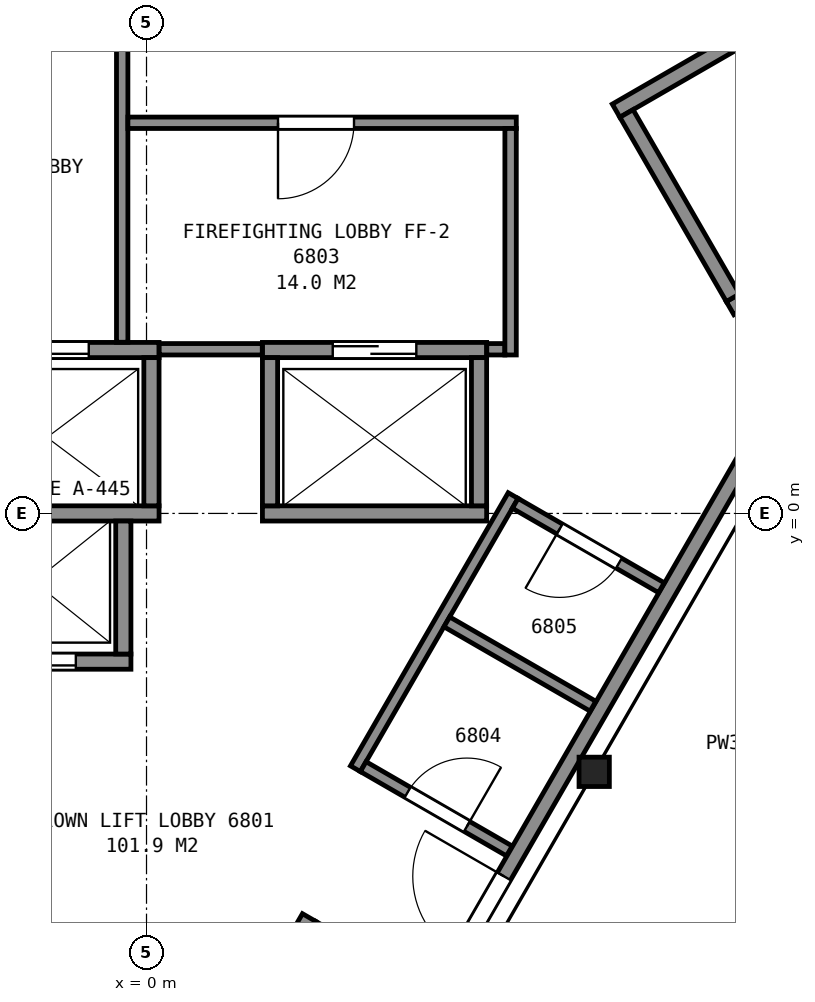
"""IFC4 building model, lengths in metres.
Left out: names, types, materials, properties, quantities, classifications, styles, units other than length and angle.
Written with IfcOpenShell. Run it as: python <this file> out.ifc"""

import sys

from ifc_helpers import new_model, si_unit, direction, frame, frame_2d, origin, origin_2d, place, context, subcontext, project, spatial, rectangle, i_section, extrude, element, fill, save


model = new_model("IFC4")
c1 = context("Model", 3, precision=1e-05, world=origin(), true_north=direction((0.0, 1.0)))
c2 = subcontext(c1, "Body", "Model", "MODEL_VIEW")
j1 = project(units=[si_unit("LENGTHUNIT", "METRE"), si_unit("PLANEANGLEUNIT", "RADIAN")], contexts=[c1])
p1 = place(None, origin())
s1 = spatial("IfcSite", under=j1, at=p1, CompositionType="ELEMENT")
p2 = place(p1, origin())
s2 = spatial("IfcBuilding", under=s1, at=p2, CompositionType="ELEMENT")
p3 = place(p2, frame((0.0, 0.0, 271.4)))
s3 = spatial("IfcBuildingStorey", under=s2, at=p3, CompositionType="ELEMENT", Elevation=271.4)
p4 = place(p3, frame((5.89, -3.4, 0.0), z_axis=(0.0, 0.0, 1.0), x_axis=(1.0, 0.0, 0.0)))
e1 = element("IfcColumn", 1, at=p4, inside=s3, PredefinedType="COLUMN", context=c2, shape_type="SweptSolid", body=[
    extrude(i_section(OverallWidth=0.399, OverallDepth=0.386, WebThickness=0.021, FlangeThickness=0.033, FilletRadius=0.015, at=origin_2d()), origin(), (0.0, 0.0, 1.0), 3.7),
])
for number, where, z_axis, x_axis in (
    (2, (6.178, 5.299, 0.0), (0.0, 0.0, 1.0), (0.866, 0.5, 0.0)),
    (3, (7.678, 2.701, 0.0), (0.0, 0.0, 1.0), (0.866, 0.5, 0.0)),
):
    element("IfcWall", number, at=place(p3, frame(where, z_axis=z_axis, x_axis=x_axis)), inside=s3, PredefinedType="PARTITIONING", context=c2, shape_type="SweptSolid", body=[
        extrude(rectangle(XDim=7.2, YDim=0.2, at=frame_2d((3.6, 0.0))), origin(), (0.0, 0.0, 1.0), 3.45),
    ])
p5 = place(p3, frame((7.715, 2.838, 0.0), z_axis=(0.0, 0.0, 1.0), x_axis=(-0.500049511043, 0.865996816683, 0.0)))
e4 = element("IfcWall", 4, at=p5, inside=s3, PredefinedType="PARTITIONING", context=c2, shape_type="SweptSolid", body=[
    extrude(rectangle(XDim=2.8, YDim=0.2, at=frame_2d((1.4, 0.0))), origin(), (0.0, 0.0, 1.0), 3.45),
])
p6 = place(p3, frame((-2.755, -1.95, 0.0), z_axis=(0.0, 0.0, 1.0), x_axis=(1.0, 0.0, 0.0)))
e5 = element("IfcWall", 5, at=p6, inside=s3, PredefinedType="PARTITIONING", context=c2, shape_type="SweptSolid", body=[
    extrude(rectangle(XDim=2.55, YDim=0.2, at=frame_2d((1.275, 0.0))), origin(), (0.0, 0.0, 1.0), 3.7),
])
p7 = place(p6, frame((0.725, 0.0, 0.0)))
e6 = element("IfcOpeningElement", 6, at=p7, cuts=e5, PredefinedType="OPENING", context=c2, shape_type="SweptSolid", body=[
    extrude(rectangle(XDim=1.1, YDim=2.1, at=frame_2d((0.55, 1.05))), frame((0.0, 0.11, 0.0), z_axis=(0.0, -1.0, 0.0), x_axis=(1.0, 0.0, 0.0)), (0.0, 0.0, 1.0), 0.22),
])
p8 = place(p3, frame((-2.785, 0.0, 0.0), z_axis=(0.0, 0.0, 1.0), x_axis=(1.0, 0.0, 0.0)))
e7 = element("IfcWall", 7, at=p8, inside=s3, PredefinedType="PARTITIONING", context=c2, shape_type="SweptSolid", body=[
    extrude(rectangle(XDim=2.95, YDim=0.2, at=frame_2d((1.475, 0.0))), origin(), (0.0, 0.0, 1.0), 3.7),
])
p9 = place(p3, frame((1.525, 0.0, 0.0), z_axis=(0.0, 0.0, 1.0), x_axis=(1.0, 0.0, 0.0)))
e8 = element("IfcWall", 8, at=p9, inside=s3, PredefinedType="PARTITIONING", context=c2, shape_type="SweptSolid", body=[
    extrude(rectangle(XDim=2.95, YDim=0.2, at=frame_2d((1.475, 0.0))), origin(), (0.0, 0.0, 1.0), 3.7),
])
p10 = place(p3, frame((-2.785, 2.15, 0.0), z_axis=(0.0, 0.0, 1.0), x_axis=(1.0, 0.0, 0.0)))
e9 = element("IfcWall", 9, at=p10, inside=s3, PredefinedType="PARTITIONING", context=c2, shape_type="SweptSolid", body=[
    extrude(rectangle(XDim=2.95, YDim=0.2, at=frame_2d((1.475, 0.0))), origin(), (0.0, 0.0, 1.0), 3.7),
])
p11 = place(p10, frame((0.925, 0.0, 0.0)))
e10 = element("IfcOpeningElement", 10, at=p11, cuts=e9, PredefinedType="OPENING", context=c2, shape_type="SweptSolid", body=[
    extrude(rectangle(XDim=1.1, YDim=2.1, at=frame_2d((0.55, 1.05))), frame((0.0, 0.11, 0.0), z_axis=(0.0, -1.0, 0.0), x_axis=(1.0, 0.0, 0.0)), (0.0, 0.0, 1.0), 0.22),
])
p12 = place(p3, frame((1.525, 2.15, 0.0), z_axis=(0.0, 0.0, 1.0), x_axis=(1.0, 0.0, 0.0)))
e11 = element("IfcWall", 11, at=p12, inside=s3, PredefinedType="PARTITIONING", context=c2, shape_type="SweptSolid", body=[
    extrude(rectangle(XDim=2.95, YDim=0.2, at=frame_2d((1.475, 0.0))), origin(), (0.0, 0.0, 1.0), 3.7),
])
p13 = place(p12, frame((0.925, 0.0, 0.0)))
e12 = element("IfcOpeningElement", 12, at=p13, cuts=e11, PredefinedType="OPENING", context=c2, shape_type="SweptSolid", body=[
    extrude(rectangle(XDim=1.1, YDim=2.1, at=frame_2d((0.55, 1.05))), frame((0.0, 0.11, 0.0), z_axis=(0.0, -1.0, 0.0), x_axis=(1.0, 0.0, 0.0)), (0.0, 0.0, 1.0), 0.22),
])
p14 = place(p3, frame((0.863, -7.525, 0.0), z_axis=(0.0, 0.0, 1.0), x_axis=(0.499990435942, 0.866030925526, 0.0)))
e13 = element("IfcWall", 13, at=p14, inside=s3, PredefinedType="PARTITIONING", context=c2, shape_type="SweptSolid", body=[
    extrude(rectangle(XDim=2.55, YDim=0.2, at=frame_2d((1.275, 0.0))), origin(), (0.0, 0.0, 1.0), 3.7),
])
p15 = place(p14, frame((0.725, 0.0, 0.0)))
e14 = element("IfcOpeningElement", 14, at=p15, cuts=e13, PredefinedType="OPENING", context=c2, shape_type="SweptSolid", body=[
    extrude(rectangle(XDim=1.1, YDim=2.1, at=frame_2d((0.55, 1.05))), frame((0.0, 0.11, 0.0), z_axis=(0.0, -1.0, 0.0), x_axis=(1.0, 0.0, 0.0)), (0.0, 0.0, 1.0), 0.22),
])
for number, where, z_axis, x_axis in (
    (15, (4.375, 0.1, 0.0), (0.0, 0.0, 1.0), (0.0, 1.0, 0.0)),
    (16, (1.625, 0.1, 0.0), (0.0, 0.0, 1.0), (0.0, 1.0, 0.0)),
    (17, (0.065, 0.1, 0.0), (0.0, 0.0, 1.0), (0.0, 1.0, 0.0)),
):
    element("IfcWall", number, at=place(p3, frame(where, z_axis=z_axis, x_axis=x_axis)), inside=s3, PredefinedType="PARTITIONING", context=c2, shape_type="SweptSolid", body=[
        extrude(rectangle(XDim=1.95, YDim=0.2, at=frame_2d((0.975, 0.0))), origin(), (0.0, 0.0, 1.0), 3.7),
    ])
for number, where, z_axis, x_axis in (
    (18, (-0.305, -1.85, 0.0), (0.0, 0.0, 1.0), (0.0, 1.0, 0.0)),
    (19, (3.69, -6.328, 0.0), (0.0, 0.0, 1.0), (-0.866, 0.5, 0.0)),
):
    element("IfcWall", number, at=place(p3, frame(where, z_axis=z_axis, x_axis=x_axis)), inside=s3, PredefinedType="PARTITIONING", context=c2, shape_type="SweptSolid", body=[
        extrude(rectangle(XDim=1.75, YDim=0.2, at=frame_2d((0.875, 0.0))), origin(), (0.0, 0.0, 1.0), 3.7),
    ])
p16 = place(p3, frame((-0.32, 2.252, 0.0), z_axis=(0.0, 0.0, 1.0), x_axis=(0.0, 1.0, 0.0)))
e20 = element("IfcWall", 20, at=p16, inside=s3, PredefinedType="PARTITIONING", context=c2, shape_type="SweptSolid", body=[
    extrude(rectangle(XDim=4.063, YDim=0.15, at=frame_2d((2.031, 0.0))), origin(), (0.0, 0.0, 1.0), 3.45),
])
p17 = place(p3, frame((-0.245, 5.14, 0.0), z_axis=(0.0, 0.0, 1.0), x_axis=(1.0, 0.0, 0.0)))
e21 = element("IfcWall", 21, at=p17, inside=s3, PredefinedType="PARTITIONING", context=c2, shape_type="SweptSolid", body=[
    extrude(rectangle(XDim=5.11, YDim=0.15, at=frame_2d((2.555, 0.0))), origin(), (0.0, 0.0, 1.0), 3.45),
])
p18 = place(p17, frame((1.975, 0.0, 0.0)))
e22 = element("IfcOpeningElement", 22, at=p18, cuts=e21, PredefinedType="OPENING", context=c2, shape_type="SweptSolid", body=[
    extrude(rectangle(XDim=1.0, YDim=2.1, at=frame_2d((0.5, 1.05))), frame((0.0, 0.085, 0.0), z_axis=(0.0, -1.0, 0.0), x_axis=(1.0, 0.0, 0.0)), (0.0, 0.0, 1.0), 0.17),
])
p19 = place(p3, frame((0.167, 2.16, 0.0), z_axis=(0.0, 0.0, 1.0), x_axis=(1.0, 0.0, 0.0)))
e23 = element("IfcWall", 23, at=p19, inside=s3, PredefinedType="PARTITIONING", context=c2, shape_type="SweptSolid", body=[
    extrude(rectangle(XDim=1.356, YDim=0.15, at=frame_2d((0.678, 0.0))), origin(), (0.0, 0.0, 1.0), 3.45),
])
p20 = place(p3, frame((2.749, -3.359, 0.0), z_axis=(0.0, 0.0, 1.0), x_axis=(0.500017827812, 0.866015110648, 0.0)))
e24 = element("IfcWall", 24, at=p20, inside=s3, PredefinedType="PARTITIONING", context=c2, shape_type="SweptSolid", body=[
    extrude(rectangle(XDim=4.15, YDim=0.15, at=frame_2d((2.075, 0.0))), origin(), (0.0, 0.0, 1.0), 3.45),
])
p21 = place(p3, frame((2.851, -3.332, 0.0), z_axis=(0.0, 0.0, 1.0), x_axis=(0.866110524189, -0.499852538144, 0.0)))
e25 = element("IfcWall", 25, at=p21, inside=s3, PredefinedType="PARTITIONING", context=c2, shape_type="SweptSolid", body=[
    extrude(rectangle(XDim=2.22, YDim=0.15, at=frame_2d((1.11, 0.0))), origin(), (0.0, 0.0, 1.0), 3.45),
])
p22 = place(p21, frame((0.675, 0.0, 0.0)))
e26 = element("IfcOpeningElement", 26, at=p22, cuts=e25, PredefinedType="OPENING", context=c2, shape_type="SweptSolid", body=[
    extrude(rectangle(XDim=0.9, YDim=2.1, at=frame_2d((0.45, 1.05))), frame((0.0, 0.085, 0.0), z_axis=(0.0, -1.0, 0.0), x_axis=(1.0, 0.0, 0.0)), (0.0, 0.0, 1.0), 0.17),
])
p23 = place(p3, frame((3.828, -6.29, 0.0), z_axis=(0.0, 0.0, 1.0), x_axis=(0.499979739078, 0.866037101117, 0.0)))
e27 = element("IfcWall", 27, at=p23, inside=s3, PredefinedType="PARTITIONING", context=c2, shape_type="SweptSolid", body=[
    extrude(rectangle(XDim=11.363, YDim=0.2, at=frame_2d((5.681, 0.0))), origin(), (0.0, 0.0, 1.0), 3.45),
])
p24 = place(p23, frame((0.55, 0.0, 0.0)))
e28 = element("IfcOpeningElement", 28, at=p24, cuts=e27, PredefinedType="OPENING", context=c2, shape_type="SweptSolid", body=[
    extrude(rectangle(XDim=1.2, YDim=2.1, at=frame_2d((0.6, 1.05))), frame((0.0, 0.11, 0.0), z_axis=(0.0, -1.0, 0.0), x_axis=(1.0, 0.0, 0.0)), (0.0, 0.0, 1.0), 0.22),
])
p25 = place(p3, frame((3.951, -1.427, 0.0), z_axis=(0.0, 0.0, 1.0), x_axis=(0.866062920605, -0.499935013329, 0.0)))
e29 = element("IfcWall", 29, at=p25, inside=s3, PredefinedType="PARTITIONING", context=c2, shape_type="SweptSolid", body=[
    extrude(rectangle(XDim=2.22, YDim=0.15, at=frame_2d((1.11, 0.0))), origin(), (0.0, 0.0, 1.0), 3.45),
])
p26 = place(p3, frame((4.477, 2.16, 0.0), z_axis=(0.0, 0.0, 1.0), x_axis=(1.0, 0.0, 0.0)))
e30 = element("IfcWall", 30, at=p26, inside=s3, PredefinedType="PARTITIONING", context=c2, shape_type="SweptSolid", body=[
    extrude(rectangle(XDim=0.238, YDim=0.15, at=frame_2d((0.119, 0.0))), origin(), (0.0, 0.0, 1.0), 3.45),
])
p27 = place(p3, frame((6.774, -0.978, 0.0), z_axis=(0.0, 0.0, 1.0), x_axis=(-0.866062920605, 0.499935013329, 0.0)))
e31 = element("IfcWall", 31, at=p27, inside=s3, PredefinedType="PARTITIONING", context=c2, shape_type="SweptSolid", body=[
    extrude(rectangle(XDim=2.22, YDim=0.15, at=frame_2d((1.11, 0.0))), origin(), (0.0, 0.0, 1.0), 3.45),
])
p28 = place(p27, frame((0.646, 0.0, 0.0)))
e32 = element("IfcOpeningElement", 32, at=p28, cuts=e31, PredefinedType="OPENING", context=c2, shape_type="SweptSolid", body=[
    extrude(rectangle(XDim=0.9, YDim=2.1, at=frame_2d((0.45, 1.05))), frame((0.0, 0.085, 0.0), z_axis=(0.0, -1.0, 0.0), x_axis=(1.0, 0.0, 0.0)), (0.0, 0.0, 1.0), 0.17),
])
p29 = place(p3, frame((4.79, 2.085, 0.0), z_axis=(0.0, 0.0, 1.0), x_axis=(0.0, 1.0, 0.0)))
e33 = element("IfcWall", 33, at=p29, inside=s3, PredefinedType="PARTITIONING", context=c2, shape_type="SweptSolid", body=[
    extrude(rectangle(XDim=2.98, YDim=0.15, at=frame_2d((1.49, 0.0))), origin(), (0.0, 0.0, 1.0), 3.45),
])
p30 = place(p7, origin())
e34 = element("IfcDoor", 34, at=p30, inside=s3, OperationType="SLIDING_TO_RIGHT", PredefinedType="DOOR", context=c2, shape_type="SweptSolid", body=[
    extrude(rectangle(XDim=1.1, YDim=2.1, at=frame_2d((0.55, 1.05))), frame((0.0, 0.025, 0.0), z_axis=(0.0, -1.0, 0.0), x_axis=(1.0, 0.0, 0.0)), (0.0, 0.0, 1.0), 0.05),
])
fill(e6, e34)
p31 = place(p11, origin())
e35 = element("IfcDoor", 35, at=p31, inside=s3, OperationType="SLIDING_TO_LEFT", PredefinedType="DOOR", context=c2, shape_type="SweptSolid", body=[
    extrude(rectangle(XDim=1.1, YDim=2.1, at=frame_2d((0.55, 1.05))), frame((0.0, 0.025, 0.0), z_axis=(0.0, -1.0, 0.0), x_axis=(1.0, 0.0, 0.0)), (0.0, 0.0, 1.0), 0.05),
])
fill(e10, e35)
p32 = place(p13, origin())
e36 = element("IfcDoor", 36, at=p32, inside=s3, OperationType="SLIDING_TO_RIGHT", PredefinedType="DOOR", context=c2, shape_type="SweptSolid", body=[
    extrude(rectangle(XDim=1.1, YDim=2.1, at=frame_2d((0.55, 1.05))), frame((0.0, 0.025, 0.0), z_axis=(0.0, -1.0, 0.0), x_axis=(1.0, 0.0, 0.0)), (0.0, 0.0, 1.0), 0.05),
])
fill(e12, e36)
p33 = place(p18, origin())
e37 = element("IfcDoor", 37, at=p33, inside=s3, OperationType="SINGLE_SWING_LEFT", PredefinedType="DOOR", context=c2, shape_type="SweptSolid", body=[
    extrude(rectangle(XDim=1.0, YDim=2.1, at=frame_2d((0.5, 1.05))), frame((0.0, 0.025, 0.0), z_axis=(0.0, -1.0, 0.0), x_axis=(1.0, 0.0, 0.0)), (0.0, 0.0, 1.0), 0.05),
])
fill(e22, e37)
p34 = place(p22, origin())
e38 = element("IfcDoor", 38, at=p34, inside=s3, OperationType="SINGLE_SWING_RIGHT", PredefinedType="DOOR", context=c2, shape_type="SweptSolid", body=[
    extrude(rectangle(XDim=0.9, YDim=2.1, at=frame_2d((0.45, 1.05))), frame((0.0, 0.025, 0.0), z_axis=(0.0, -1.0, 0.0), x_axis=(1.0, 0.0, 0.0)), (0.0, 0.0, 1.0), 0.05),
])
fill(e26, e38)
p35 = place(p24, origin())
e39 = element("IfcDoor", 39, at=p35, inside=s3, OperationType="SINGLE_SWING_RIGHT", PredefinedType="DOOR", context=c2, shape_type="SweptSolid", body=[
    extrude(rectangle(XDim=1.2, YDim=2.1, at=frame_2d((0.6, 1.05))), frame((0.0, 0.025, 0.0), z_axis=(0.0, -1.0, 0.0), x_axis=(1.0, 0.0, 0.0)), (0.0, 0.0, 1.0), 0.05),
])
fill(e28, e39)
p36 = place(p28, origin())
e40 = element("IfcDoor", 40, at=p36, inside=s3, OperationType="SINGLE_SWING_RIGHT", PredefinedType="DOOR", context=c2, shape_type="SweptSolid", body=[
    extrude(rectangle(XDim=0.9, YDim=2.1, at=frame_2d((0.45, 1.05))), frame((0.0, 0.025, 0.0), z_axis=(0.0, -1.0, 0.0), x_axis=(1.0, 0.0, 0.0)), (0.0, 0.0, 1.0), 0.05),
])
fill(e32, e40)
save(model, sys.argv[1])
